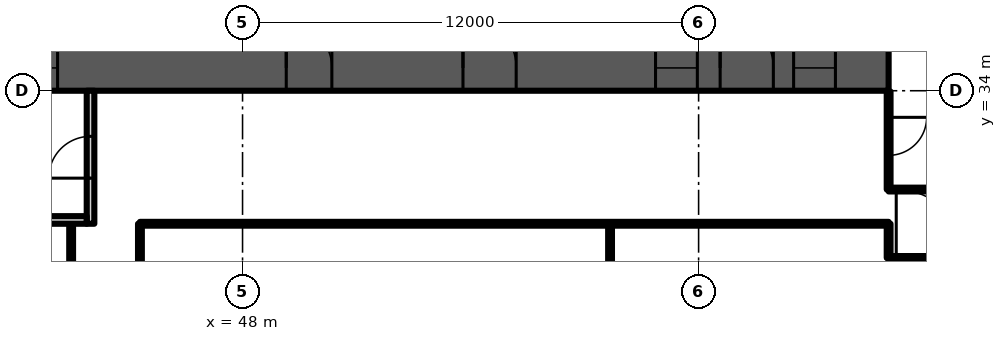
"""IFC4 building model, lengths in metres.
Left out: names, types, materials, properties, quantities, classifications, styles, units other than length and angle.
Written with IfcOpenShell. Run it as: python <this file> out.ifc"""

import sys

from ifc_helpers import new_model, si_unit, direction, frame, frame_2d, origin, place, context, subcontext, project, spatial, rectangle, extrude, element, fill, save


model = new_model("IFC4")
c1 = context("Model", 3, precision=1e-05, world=origin(), true_north=direction((0.0, 1.0)))
c2 = subcontext(c1, "Body", "Model", "MODEL_VIEW")
j1 = project(units=[si_unit("LENGTHUNIT", "METRE"), si_unit("PLANEANGLEUNIT", "RADIAN")], contexts=[c1])
p1 = place(None, origin())
s1 = spatial("IfcSite", under=j1, at=p1, CompositionType="ELEMENT")
p2 = place(p1, origin())
s2 = spatial("IfcBuilding", under=s1, at=p2, CompositionType="ELEMENT")
p3 = place(p2, frame((0.0, 0.0, 77.5)))
s3 = spatial("IfcBuildingStorey", under=s2, at=p3, CompositionType="ELEMENT", Elevation=77.5)
p4 = place(p3, frame((9.0, 34.6, 0.0), z_axis=(0.0, 0.0, 1.0), x_axis=(1.0, 0.0, 0.0)))
e1 = element("IfcWall", 1, at=p4, inside=s3, PredefinedType="SHEAR", context=c2, shape_type="SweptSolid", body=[
    extrude(rectangle(XDim=56.0, YDim=1.2, at=frame_2d((28.0, 0.0))), origin(), (0.0, 0.0, 1.0), 3.6),
])
p5 = place(p4, frame((3.3, 0.0, 0.0)))
e2 = element("IfcOpeningElement", 2, at=p5, cuts=e1, PredefinedType="OPENING", context=c2, shape_type="SweptSolid", body=[
    extrude(rectangle(XDim=1.0, YDim=2.1, at=frame_2d((0.5, 1.05))), frame((0.0, 0.61, 0.0), z_axis=(0.0, -1.0, 0.0), x_axis=(1.0, 0.0, 0.0)), (0.0, 0.0, 1.0), 1.22),
])
p6 = place(p4, frame((7.867, 0.0, 0.0)))
e3 = element("IfcOpeningElement", 3, at=p6, cuts=e1, PredefinedType="OPENING", context=c2, shape_type="SweptSolid", body=[
    extrude(rectangle(XDim=1.1, YDim=2.1, at=frame_2d((0.55, 1.05))), frame((0.0, 0.61, 0.0), z_axis=(0.0, -1.0, 0.0), x_axis=(1.0, 0.0, 0.0)), (0.0, 0.0, 1.0), 1.22),
])
p7 = place(p4, frame((12.033, 0.0, 0.0)))
e4 = element("IfcOpeningElement", 4, at=p7, cuts=e1, PredefinedType="OPENING", context=c2, shape_type="SweptSolid", body=[
    extrude(rectangle(XDim=1.1, YDim=2.1, at=frame_2d((0.55, 1.05))), frame((0.0, 0.61, 0.0), z_axis=(0.0, -1.0, 0.0), x_axis=(1.0, 0.0, 0.0)), (0.0, 0.0, 1.0), 1.22),
])
p8 = place(p4, frame((9.8, 0.0, 0.0)))
e5 = element("IfcOpeningElement", 5, at=p8, cuts=e1, PredefinedType="OPENING", context=c2, shape_type="SweptSolid", body=[
    extrude(rectangle(XDim=1.4, YDim=2.1, at=frame_2d((0.7, 1.05))), frame((0.0, 0.61, 0.0), z_axis=(0.0, -1.0, 0.0), x_axis=(1.0, 0.0, 0.0)), (0.0, 0.0, 1.0), 1.22),
])
p9 = place(p4, frame((14.65, 0.0, 0.0)))
e6 = element("IfcOpeningElement", 6, at=p9, cuts=e1, PredefinedType="OPENING", context=c2, shape_type="SweptSolid", body=[
    extrude(rectangle(XDim=1.2, YDim=2.1, at=frame_2d((0.6, 1.05))), frame((0.0, 0.61, 0.0), z_axis=(0.0, -1.0, 0.0), x_axis=(1.0, 0.0, 0.0)), (0.0, 0.0, 1.0), 1.22),
])
p10 = place(p4, frame((21.867, 0.0, 0.0)))
e7 = element("IfcOpeningElement", 7, at=p10, cuts=e1, PredefinedType="OPENING", context=c2, shape_type="SweptSolid", body=[
    extrude(rectangle(XDim=1.1, YDim=2.1, at=frame_2d((0.55, 1.05))), frame((0.0, 0.61, 0.0), z_axis=(0.0, -1.0, 0.0), x_axis=(1.0, 0.0, 0.0)), (0.0, 0.0, 1.0), 1.22),
])
p11 = place(p4, frame((26.033, 0.0, 0.0)))
e8 = element("IfcOpeningElement", 8, at=p11, cuts=e1, PredefinedType="OPENING", context=c2, shape_type="SweptSolid", body=[
    extrude(rectangle(XDim=1.1, YDim=2.1, at=frame_2d((0.55, 1.05))), frame((0.0, 0.61, 0.0), z_axis=(0.0, -1.0, 0.0), x_axis=(1.0, 0.0, 0.0)), (0.0, 0.0, 1.0), 1.22),
])
p12 = place(p4, frame((23.8, 0.0, 0.0)))
e9 = element("IfcOpeningElement", 9, at=p12, cuts=e1, PredefinedType="OPENING", context=c2, shape_type="SweptSolid", body=[
    extrude(rectangle(XDim=1.4, YDim=2.1, at=frame_2d((0.7, 1.05))), frame((0.0, 0.61, 0.0), z_axis=(0.0, -1.0, 0.0), x_axis=(1.0, 0.0, 0.0)), (0.0, 0.0, 1.0), 1.22),
])
p13 = place(p4, frame((28.867, 0.0, 0.0)))
e10 = element("IfcOpeningElement", 10, at=p13, cuts=e1, PredefinedType="OPENING", context=c2, shape_type="SweptSolid", body=[
    extrude(rectangle(XDim=1.1, YDim=2.1, at=frame_2d((0.55, 1.05))), frame((0.0, 0.61, 0.0), z_axis=(0.0, -1.0, 0.0), x_axis=(1.0, 0.0, 0.0)), (0.0, 0.0, 1.0), 1.22),
])
p14 = place(p4, frame((33.033, 0.0, 0.0)))
e11 = element("IfcOpeningElement", 11, at=p14, cuts=e1, PredefinedType="OPENING", context=c2, shape_type="SweptSolid", body=[
    extrude(rectangle(XDim=1.1, YDim=2.1, at=frame_2d((0.55, 1.05))), frame((0.0, 0.61, 0.0), z_axis=(0.0, -1.0, 0.0), x_axis=(1.0, 0.0, 0.0)), (0.0, 0.0, 1.0), 1.22),
])
p15 = place(p4, frame((40.15, 0.0, 0.0)))
e12 = element("IfcOpeningElement", 12, at=p15, cuts=e1, PredefinedType="OPENING", context=c2, shape_type="SweptSolid", body=[
    extrude(rectangle(XDim=1.2, YDim=2.1, at=frame_2d((0.6, 1.05))), frame((0.0, 0.61, 0.0), z_axis=(0.0, -1.0, 0.0), x_axis=(1.0, 0.0, 0.0)), (0.0, 0.0, 1.0), 1.22),
])
p16 = place(p4, frame((44.8, 0.0, 0.0)))
e13 = element("IfcOpeningElement", 13, at=p16, cuts=e1, PredefinedType="OPENING", context=c2, shape_type="SweptSolid", body=[
    extrude(rectangle(XDim=1.4, YDim=2.1, at=frame_2d((0.7, 1.05))), frame((0.0, 0.61, 0.0), z_axis=(0.0, -1.0, 0.0), x_axis=(1.0, 0.0, 0.0)), (0.0, 0.0, 1.0), 1.22),
])
p17 = place(p4, frame((49.867, 0.0, 0.0)))
e14 = element("IfcOpeningElement", 14, at=p17, cuts=e1, PredefinedType="OPENING", context=c2, shape_type="SweptSolid", body=[
    extrude(rectangle(XDim=1.1, YDim=2.1, at=frame_2d((0.55, 1.05))), frame((0.0, 0.61, 0.0), z_axis=(0.0, -1.0, 0.0), x_axis=(1.0, 0.0, 0.0)), (0.0, 0.0, 1.0), 1.22),
])
p18 = place(p4, frame((53.5, 0.0, 0.0)))
e15 = element("IfcOpeningElement", 15, at=p18, cuts=e1, PredefinedType="OPENING", context=c2, shape_type="SweptSolid", body=[
    extrude(rectangle(XDim=1.1, YDim=2.1, at=frame_2d((0.55, 1.05))), frame((0.0, 0.61, 0.0), z_axis=(0.0, -1.0, 0.0), x_axis=(1.0, 0.0, 0.0)), (0.0, 0.0, 1.0), 1.22),
])
p19 = place(p4, frame((51.567, 0.0, 0.0)))
e16 = element("IfcOpeningElement", 16, at=p19, cuts=e1, PredefinedType="OPENING", context=c2, shape_type="SweptSolid", body=[
    extrude(rectangle(XDim=1.4, YDim=2.1, at=frame_2d((0.7, 1.05))), frame((0.0, 0.61, 0.0), z_axis=(0.0, -1.0, 0.0), x_axis=(1.0, 0.0, 0.0)), (0.0, 0.0, 1.0), 1.22),
])
p20 = place(p3, frame((44.0, 30.5, 0.0), z_axis=(0.0, 0.0, 1.0), x_axis=(0.0, 1.0, 0.0)))
e17 = element("IfcWall", 17, at=p20, inside=s3, PredefinedType="PARTITIONING", context=c2, shape_type="SweptSolid", body=[
    extrude(rectangle(XDim=3.5, YDim=0.2, at=frame_2d((1.75, 0.0))), origin(), (0.0, 0.0, 1.0), 3.2),
])
p21 = place(p20, frame((1.2, 0.0, 0.0)))
e18 = element("IfcOpeningElement", 18, at=p21, cuts=e17, PredefinedType="OPENING", context=c2, shape_type="SweptSolid", body=[
    extrude(rectangle(XDim=1.1, YDim=2.1, at=frame_2d((0.55, 1.05))), frame((0.0, 0.11, 0.0), z_axis=(0.0, -1.0, 0.0), x_axis=(1.0, 0.0, 0.0)), (0.0, 0.0, 1.0), 0.22),
])
p22 = place(p3, frame((41.1, 30.6, 0.0), z_axis=(0.0, 0.0, 1.0), x_axis=(1.0, 0.0, 0.0)))
e19 = element("IfcWall", 19, at=p22, inside=s3, PredefinedType="PARTITIONING", context=c2, shape_type="SweptSolid", body=[
    extrude(rectangle(XDim=2.8, YDim=0.2, at=frame_2d((1.4, 0.0))), origin(), (0.0, 0.0, 1.0), 3.2),
])
p23 = place(p3, frame((43.49, 13.24, 0.0), z_axis=(0.0, 0.0, 1.0), x_axis=(0.0, 1.0, 0.0)))
e20 = element("IfcWall", 20, at=p23, inside=s3, PredefinedType="PARTITIONING", context=c2, shape_type="SweptSolid", body=[
    extrude(rectangle(XDim=17.25, YDim=0.1, at=frame_2d((8.625, 0.0))), origin(), (0.0, 0.0, 1.0), 3.2),
])
p24 = place(p23, frame((8.139, 0.0, 0.0)))
e21 = element("IfcOpeningElement", 21, at=p24, cuts=e20, PredefinedType="OPENING", context=c2, shape_type="SweptSolid", body=[
    extrude(rectangle(XDim=1.0, YDim=2.1, at=frame_2d((0.5, 1.05))), frame((0.0, 0.06, 0.0), z_axis=(0.0, -1.0, 0.0), x_axis=(1.0, 0.0, 0.0)), (0.0, 0.0, 1.0), 0.12),
])
p25 = place(p3, frame((45.3, -3.943, 0.0), z_axis=(0.0, 0.0, 1.0), x_axis=(0.0, 1.0, 0.0)))
e22 = element("IfcWall", 22, at=p25, inside=s3, PredefinedType="PARTITIONING", context=c2, shape_type="SweptSolid", body=[
    extrude(rectangle(XDim=34.443, YDim=0.1, at=frame_2d((17.222, 0.0))), origin(), (0.0, 0.0, 1.0), 2.58),
])
p26 = place(p25, frame((1.598, 0.0, 0.0)))
e23 = element("IfcOpeningElement", 23, at=p26, cuts=e22, PredefinedType="OPENING", context=c2, shape_type="SweptSolid", body=[
    extrude(rectangle(XDim=1.0, YDim=2.1, at=frame_2d((0.5, 1.05))), frame((0.0, 0.06, 0.0), z_axis=(0.0, -1.0, 0.0), x_axis=(1.0, 0.0, 0.0)), (0.0, 0.0, 1.0), 0.12),
])
p27 = place(p25, frame((5.853, 0.0, 0.0)))
e24 = element("IfcOpeningElement", 24, at=p27, cuts=e22, PredefinedType="OPENING", context=c2, shape_type="SweptSolid", body=[
    extrude(rectangle(XDim=1.0, YDim=2.1, at=frame_2d((0.5, 1.05))), frame((0.0, 0.06, 0.0), z_axis=(0.0, -1.0, 0.0), x_axis=(1.0, 0.0, 0.0)), (0.0, 0.0, 1.0), 0.12),
])
p28 = place(p25, frame((10.173, 0.0, 0.0)))
e25 = element("IfcOpeningElement", 25, at=p28, cuts=e22, PredefinedType="OPENING", context=c2, shape_type="SweptSolid", body=[
    extrude(rectangle(XDim=1.0, YDim=2.1, at=frame_2d((0.5, 1.05))), frame((0.0, 0.06, 0.0), z_axis=(0.0, -1.0, 0.0), x_axis=(1.0, 0.0, 0.0)), (0.0, 0.0, 1.0), 0.12),
])
p29 = place(p25, frame((14.488, 0.0, 0.0)))
e26 = element("IfcOpeningElement", 26, at=p29, cuts=e22, PredefinedType="OPENING", context=c2, shape_type="SweptSolid", body=[
    extrude(rectangle(XDim=1.0, YDim=2.1, at=frame_2d((0.5, 1.05))), frame((0.0, 0.06, 0.0), z_axis=(0.0, -1.0, 0.0), x_axis=(1.0, 0.0, 0.0)), (0.0, 0.0, 1.0), 0.12),
])
p30 = place(p25, frame((31.403, 0.0, 0.0)))
e27 = element("IfcOpeningElement", 27, at=p30, cuts=e22, PredefinedType="OPENING", context=c2, shape_type="SweptSolid", body=[
    extrude(rectangle(XDim=1.0, YDim=2.1, at=frame_2d((0.5, 1.05))), frame((0.0, 0.06, 0.0), z_axis=(0.0, -1.0, 0.0), x_axis=(1.0, 0.0, 0.0)), (0.0, 0.0, 1.0), 0.12),
])
p31 = place(p3, frame((45.3, 30.5, 0.0), z_axis=(0.0, 0.0, 1.0), x_axis=(1.0, 0.0, 0.0)))
e28 = element("IfcWall", 28, at=p31, inside=s3, PredefinedType="PARTITIONING", context=c2, shape_type="SweptSolid", body=[
    extrude(rectangle(XDim=19.7, YDim=0.1, at=frame_2d((9.85, 0.0))), origin(), (0.0, 0.0, 1.0), 3.2),
])
p32 = place(p3, frame((57.67, 13.24, 0.0), z_axis=(0.0, 0.0, 1.0), x_axis=(0.0, 1.0, 0.0)))
e29 = element("IfcWall", 29, at=p32, inside=s3, PredefinedType="PARTITIONING", context=c2, shape_type="SweptSolid", body=[
    extrude(rectangle(XDim=17.26, YDim=0.1, at=frame_2d((8.63, 0.0))), origin(), (0.0, 0.0, 1.0), 3.2),
])
p33 = place(p3, frame((65.0, 29.6, 0.0), z_axis=(0.0, 0.0, 1.0), x_axis=(0.0, 1.0, 0.0)))
e30 = element("IfcWall", 30, at=p33, inside=s3, PredefinedType="PARTITIONING", context=c2, shape_type="SweptSolid", body=[
    extrude(rectangle(XDim=0.9, YDim=0.1, at=frame_2d((0.45, 0.0))), origin(), (0.0, 0.0, 1.0), 3.2),
])
p34 = place(p3, frame((65.0, 29.6, 0.0), z_axis=(0.0, 0.0, 1.0), x_axis=(1.0, 0.0, 0.0)))
e31 = element("IfcWall", 31, at=p34, inside=s3, PredefinedType="PARTITIONING", context=c2, shape_type="SweptSolid", body=[
    extrude(rectangle(XDim=4.425, YDim=0.1, at=frame_2d((2.212, 0.0))), origin(), (0.0, 0.0, 1.0), 3.2),
])
p35 = place(p34, frame((0.2, 0.0, 0.0)))
e32 = element("IfcOpeningElement", 32, at=p35, cuts=e31, PredefinedType="OPENING", context=c2, shape_type="SweptSolid", body=[
    extrude(rectangle(XDim=1.8, YDim=2.1, at=frame_2d((0.9, 1.05))), frame((0.0, 0.06, 0.0), z_axis=(0.0, -1.0, 0.0), x_axis=(1.0, 0.0, 0.0)), (0.0, 0.0, 1.0), 0.12),
])
p36 = place(p3, frame((65.0, 31.4, 0.0), z_axis=(0.0, 0.0, 1.0), x_axis=(0.0, 1.0, 0.0)))
e33 = element("IfcWall", 33, at=p36, inside=s3, PredefinedType="PARTITIONING", context=c2, shape_type="SweptSolid", body=[
    extrude(rectangle(XDim=2.58, YDim=0.1, at=frame_2d((1.29, 0.0))), origin(), (0.0, 0.0, 1.0), 3.2),
])
p37 = place(p36, frame((0.9, 0.0, 0.0)))
e34 = element("IfcOpeningElement", 34, at=p37, cuts=e33, PredefinedType="OPENING", context=c2, shape_type="SweptSolid", body=[
    extrude(rectangle(XDim=1.0, YDim=2.1, at=frame_2d((0.5, 1.05))), frame((0.0, 0.06, 0.0), z_axis=(0.0, -1.0, 0.0), x_axis=(1.0, 0.0, 0.0)), (0.0, 0.0, 1.0), 0.12),
])
p38 = place(p3, frame((65.0, 31.4, 0.0), z_axis=(0.0, 0.0, 1.0), x_axis=(1.0, 0.0, 0.0)))
e35 = element("IfcWall", 35, at=p38, inside=s3, PredefinedType="PARTITIONING", context=c2, shape_type="SweptSolid", body=[
    extrude(rectangle(XDim=7.81, YDim=0.1, at=frame_2d((3.905, 0.0))), origin(), (0.0, 0.0, 1.0), 3.2),
])
p39 = place(p38, frame((6.657, 0.0, 0.0)))
e36 = element("IfcOpeningElement", 36, at=p39, cuts=e35, PredefinedType="OPENING", context=c2, shape_type="SweptSolid", body=[
    extrude(rectangle(XDim=1.0, YDim=2.1, at=frame_2d((0.5, 1.05))), frame((0.0, 0.06, 0.0), z_axis=(0.0, -1.0, 0.0), x_axis=(1.0, 0.0, 0.0)), (0.0, 0.0, 1.0), 0.12),
])
p40 = place(p14, origin())
e37 = element("IfcDoor", 37, at=p40, inside=s3, OperationType="DOUBLE_DOOR_SLIDING", PredefinedType="DOOR", context=c2, shape_type="SweptSolid", body=[
    extrude(rectangle(XDim=1.1, YDim=2.1, at=frame_2d((0.55, 1.05))), frame((0.0, 0.025, 0.0), z_axis=(0.0, -1.0, 0.0), x_axis=(1.0, 0.0, 0.0)), (0.0, 0.0, 1.0), 0.05),
])
fill(e11, e37)
p41 = place(p15, origin())
e38 = element("IfcDoor", 38, at=p41, inside=s3, OperationType="SINGLE_SWING_LEFT", PredefinedType="DOOR", context=c2, shape_type="SweptSolid", body=[
    extrude(rectangle(XDim=1.2, YDim=2.1, at=frame_2d((0.6, 1.05))), frame((0.0, 0.025, 0.0), z_axis=(0.0, -1.0, 0.0), x_axis=(1.0, 0.0, 0.0)), (0.0, 0.0, 1.0), 0.05),
])
fill(e12, e38)
p42 = place(p16, origin())
e39 = element("IfcDoor", 39, at=p42, inside=s3, OperationType="DOUBLE_DOOR_SINGLE_SWING", PredefinedType="DOOR", context=c2, shape_type="SweptSolid", body=[
    extrude(rectangle(XDim=1.4, YDim=2.1, at=frame_2d((0.7, 1.05))), frame((0.0, 0.025, 0.0), z_axis=(0.0, -1.0, 0.0), x_axis=(1.0, 0.0, 0.0)), (0.0, 0.0, 1.0), 0.05),
])
fill(e13, e39)
p43 = place(p17, origin())
e40 = element("IfcDoor", 40, at=p43, inside=s3, OperationType="DOUBLE_DOOR_SLIDING", PredefinedType="DOOR", context=c2, shape_type="SweptSolid", body=[
    extrude(rectangle(XDim=1.1, YDim=2.1, at=frame_2d((0.55, 1.05))), frame((0.0, 0.025, 0.0), z_axis=(0.0, -1.0, 0.0), x_axis=(1.0, 0.0, 0.0)), (0.0, 0.0, 1.0), 0.05),
])
fill(e14, e40)
p44 = place(p18, origin())
e41 = element("IfcDoor", 41, at=p44, inside=s3, OperationType="DOUBLE_DOOR_SLIDING", PredefinedType="DOOR", context=c2, shape_type="SweptSolid", body=[
    extrude(rectangle(XDim=1.1, YDim=2.1, at=frame_2d((0.55, 1.05))), frame((0.0, 0.025, 0.0), z_axis=(0.0, -1.0, 0.0), x_axis=(1.0, 0.0, 0.0)), (0.0, 0.0, 1.0), 0.05),
])
fill(e15, e41)
p45 = place(p19, origin())
e42 = element("IfcDoor", 42, at=p45, inside=s3, OperationType="DOUBLE_DOOR_SINGLE_SWING", PredefinedType="DOOR", context=c2, shape_type="SweptSolid", body=[
    extrude(rectangle(XDim=1.4, YDim=2.1, at=frame_2d((0.7, 1.05))), frame((0.0, 0.025, 0.0), z_axis=(0.0, -1.0, 0.0), x_axis=(1.0, 0.0, 0.0)), (0.0, 0.0, 1.0), 0.05),
])
fill(e16, e42)
p46 = place(p21, origin())
e43 = element("IfcDoor", 43, at=p46, inside=s3, OperationType="SINGLE_SWING_LEFT", PredefinedType="DOOR", context=c2, shape_type="SweptSolid", body=[
    extrude(rectangle(XDim=1.1, YDim=2.1, at=frame_2d((0.55, 1.05))), frame((0.0, 0.025, 0.0), z_axis=(0.0, -1.0, 0.0), x_axis=(1.0, 0.0, 0.0)), (0.0, 0.0, 1.0), 0.05),
])
fill(e18, e43)
p47 = place(p35, origin())
e44 = element("IfcDoor", 44, at=p47, inside=s3, OperationType="DOUBLE_DOOR_SINGLE_SWING", PredefinedType="DOOR", context=c2, shape_type="SweptSolid", body=[
    extrude(rectangle(XDim=1.8, YDim=2.1, at=frame_2d((0.9, 1.05))), frame((0.0, 0.025, 0.0), z_axis=(0.0, -1.0, 0.0), x_axis=(1.0, 0.0, 0.0)), (0.0, 0.0, 1.0), 0.05),
])
fill(e32, e44)
p48 = place(p37, origin())
e45 = element("IfcDoor", 45, at=p48, inside=s3, OperationType="SINGLE_SWING_RIGHT", PredefinedType="DOOR", context=c2, shape_type="SweptSolid", body=[
    extrude(rectangle(XDim=1.0, YDim=2.1, at=frame_2d((0.5, 1.05))), frame((0.0, 0.025, 0.0), z_axis=(0.0, -1.0, 0.0), x_axis=(1.0, 0.0, 0.0)), (0.0, 0.0, 1.0), 0.05),
])
fill(e34, e45)
save(model, sys.argv[1])
